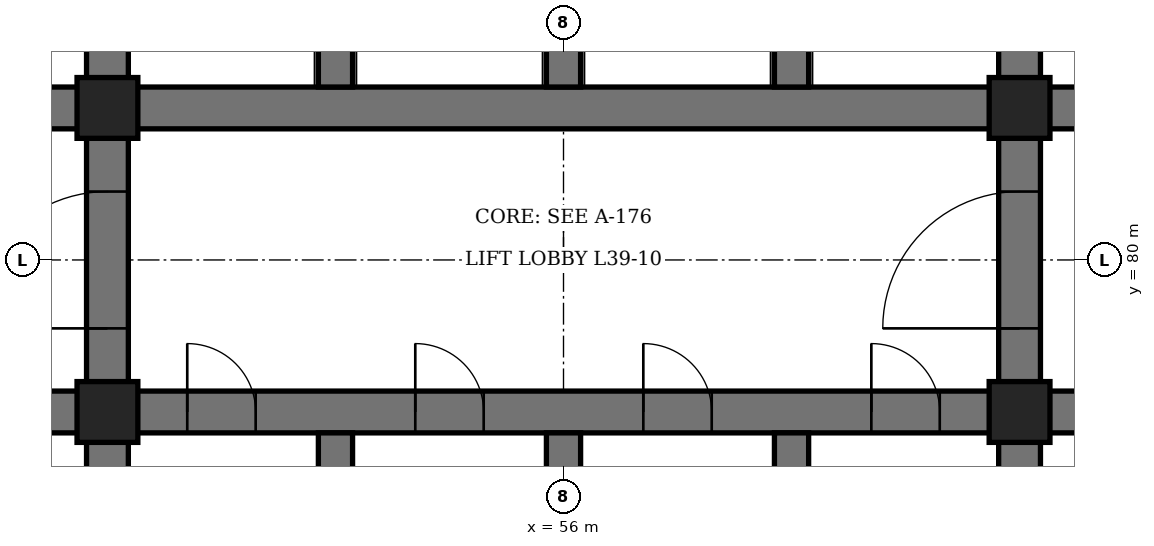
"""IFC4 building model, lengths in metres.
Left out: names, types, materials, properties, quantities, classifications, styles, units other than length and angle.
Written with IfcOpenShell. Run it as: python <this file> out.ifc"""

import sys

from ifc_helpers import new_model, si_unit, direction, frame, frame_2d, origin, origin_2d, place, context, subcontext, project, spatial, rectangle, hollow_rectangle, extrude, element, fill, save


model = new_model("IFC4")
c1 = context("Model", 3, precision=1e-05, world=origin(), true_north=direction((0.0, 1.0)))
c2 = subcontext(c1, "Body", "Model", "MODEL_VIEW")
j1 = project(units=[si_unit("LENGTHUNIT", "METRE"), si_unit("PLANEANGLEUNIT", "RADIAN")], contexts=[c1])
p1 = place(None, origin())
s1 = spatial("IfcSite", under=j1, at=p1, CompositionType="ELEMENT")
p2 = place(p1, origin())
s2 = spatial("IfcBuilding", under=s1, at=p2, CompositionType="ELEMENT")
p3 = place(p2, frame((0.0, 0.0, 175.3)))
s3 = spatial("IfcBuildingStorey", under=s2, at=p3, CompositionType="ELEMENT", Elevation=175.3)
p4 = place(p3, frame((50.0, 71.6, 0.0), z_axis=(0.0, 0.0, 1.0), x_axis=(0.0, 1.0, 0.0)))
e1 = element("IfcWall", 1, at=p4, inside=s3, PredefinedType="SHEAR", context=c2, shape_type="SweptSolid", body=[
    extrude(rectangle(XDim=16.8, YDim=0.55, at=frame_2d((8.4, 0.0))), origin(), (0.0, 0.0, 1.0), 6.0),
])
p5 = place(p4, frame((7.5, 0.0, 0.0)))
e2 = element("IfcOpeningElement", 2, at=p5, cuts=e1, PredefinedType="OPENING", context=c2, shape_type="SweptSolid", body=[
    extrude(rectangle(XDim=1.8, YDim=2.4, at=frame_2d((0.9, 1.2))), frame((0.0, 0.285, 0.0), z_axis=(0.0, -1.0, 0.0), x_axis=(1.0, 0.0, 0.0)), (0.0, 0.0, 1.0), 0.57),
])
p6 = place(p3, frame((62.0, 71.6, 0.0), z_axis=(0.0, 0.0, 1.0), x_axis=(0.0, 1.0, 0.0)))
e3 = element("IfcWall", 3, at=p6, inside=s3, PredefinedType="SHEAR", context=c2, shape_type="SweptSolid", body=[
    extrude(rectangle(XDim=16.8, YDim=0.55, at=frame_2d((8.4, 0.0))), origin(), (0.0, 0.0, 1.0), 6.0),
])
p7 = place(p6, frame((7.5, 0.0, 0.0)))
e4 = element("IfcOpeningElement", 4, at=p7, cuts=e3, PredefinedType="OPENING", context=c2, shape_type="SweptSolid", body=[
    extrude(rectangle(XDim=1.8, YDim=2.4, at=frame_2d((0.9, 1.2))), frame((0.0, 0.285, 0.0), z_axis=(0.0, -1.0, 0.0), x_axis=(1.0, 0.0, 0.0)), (0.0, 0.0, 1.0), 0.57),
])
p8 = place(p3, frame((44.6, 78.0, 0.0), z_axis=(0.0, 0.0, 1.0), x_axis=(1.0, 0.0, 0.0)))
e5 = element("IfcWall", 5, at=p8, inside=s3, PredefinedType="SHEAR", context=c2, shape_type="SweptSolid", body=[
    extrude(rectangle(XDim=5.125, YDim=0.55, at=frame_2d((2.562, 0.0))), origin(), (0.0, 0.0, 1.0), 6.0),
])
p9 = place(p8, frame((1.8, 0.0, 0.0)))
e6 = element("IfcOpeningElement", 6, at=p9, cuts=e5, PredefinedType="OPENING", context=c2, shape_type="SweptSolid", body=[
    extrude(rectangle(XDim=1.2, YDim=2.1, at=frame_2d((0.6, 1.05))), frame((0.0, 0.285, 0.0), z_axis=(0.0, -1.0, 0.0), x_axis=(1.0, 0.0, 0.0)), (0.0, 0.0, 1.0), 0.57),
])
p10 = place(p3, frame((44.6, 82.0, 0.0), z_axis=(0.0, 0.0, 1.0), x_axis=(1.0, 0.0, 0.0)))
e7 = element("IfcWall", 7, at=p10, inside=s3, PredefinedType="SHEAR", context=c2, shape_type="SweptSolid", body=[
    extrude(rectangle(XDim=5.125, YDim=0.55, at=frame_2d((2.562, 0.0))), origin(), (0.0, 0.0, 1.0), 6.0),
])
p11 = place(p10, frame((0.7, 0.0, 0.0)))
e8 = element("IfcOpeningElement", 8, at=p11, cuts=e7, PredefinedType="OPENING", context=c2, shape_type="SweptSolid", body=[
    extrude(rectangle(XDim=0.9, YDim=2.1, at=frame_2d((0.45, 1.05))), frame((0.0, 0.285, 0.0), z_axis=(0.0, -1.0, 0.0), x_axis=(1.0, 0.0, 0.0)), (0.0, 0.0, 1.0), 0.57),
])
p12 = place(p3, frame((62.275, 78.0, 0.0), z_axis=(0.0, 0.0, 1.0), x_axis=(1.0, 0.0, 0.0)))
e9 = element("IfcWall", 9, at=p12, inside=s3, PredefinedType="SHEAR", context=c2, shape_type="SweptSolid", body=[
    extrude(rectangle(XDim=5.125, YDim=0.55, at=frame_2d((2.562, 0.0))), origin(), (0.0, 0.0, 1.0), 6.0),
])
p13 = place(p12, frame((2.125, 0.0, 0.0)))
e10 = element("IfcOpeningElement", 10, at=p13, cuts=e9, PredefinedType="OPENING", context=c2, shape_type="SweptSolid", body=[
    extrude(rectangle(XDim=1.2, YDim=2.1, at=frame_2d((0.6, 1.05))), frame((0.0, 0.285, 0.0), z_axis=(0.0, -1.0, 0.0), x_axis=(1.0, 0.0, 0.0)), (0.0, 0.0, 1.0), 0.57),
])
p14 = place(p3, frame((62.275, 82.0, 0.0), z_axis=(0.0, 0.0, 1.0), x_axis=(1.0, 0.0, 0.0)))
e11 = element("IfcWall", 11, at=p14, inside=s3, PredefinedType="SHEAR", context=c2, shape_type="SweptSolid", body=[
    extrude(rectangle(XDim=5.125, YDim=0.55, at=frame_2d((2.562, 0.0))), origin(), (0.0, 0.0, 1.0), 6.0),
])
p15 = place(p14, frame((2.125, 0.0, 0.0)))
e12 = element("IfcOpeningElement", 12, at=p15, cuts=e11, PredefinedType="OPENING", context=c2, shape_type="SweptSolid", body=[
    extrude(rectangle(XDim=1.2, YDim=2.1, at=frame_2d((0.6, 1.05))), frame((0.0, 0.285, 0.0), z_axis=(0.0, -1.0, 0.0), x_axis=(1.0, 0.0, 0.0)), (0.0, 0.0, 1.0), 0.57),
])
p16 = place(p3, frame((50.275, 78.0, 0.0), z_axis=(0.0, 0.0, 1.0), x_axis=(1.0, 0.0, 0.0)))
e13 = element("IfcWall", 13, at=p16, inside=s3, PredefinedType="SHEAR", context=c2, shape_type="SweptSolid", body=[
    extrude(rectangle(XDim=11.45, YDim=0.55, at=frame_2d((5.725, 0.0))), origin(), (0.0, 0.0, 1.0), 6.0),
])
p17 = place(p16, frame((0.775, 0.0, 0.0)))
e14 = element("IfcOpeningElement", 14, at=p17, cuts=e13, PredefinedType="OPENING", context=c2, shape_type="SweptSolid", body=[
    extrude(rectangle(XDim=0.9, YDim=2.1, at=frame_2d((0.45, 1.05))), frame((0.0, 0.285, 0.0), z_axis=(0.0, -1.0, 0.0), x_axis=(1.0, 0.0, 0.0)), (0.0, 0.0, 1.0), 0.57),
])
p18 = place(p16, frame((3.775, 0.0, 0.0)))
e15 = element("IfcOpeningElement", 15, at=p18, cuts=e13, PredefinedType="OPENING", context=c2, shape_type="SweptSolid", body=[
    extrude(rectangle(XDim=0.9, YDim=2.1, at=frame_2d((0.45, 1.05))), frame((0.0, 0.285, 0.0), z_axis=(0.0, -1.0, 0.0), x_axis=(1.0, 0.0, 0.0)), (0.0, 0.0, 1.0), 0.57),
])
p19 = place(p16, frame((6.775, 0.0, 0.0)))
e16 = element("IfcOpeningElement", 16, at=p19, cuts=e13, PredefinedType="OPENING", context=c2, shape_type="SweptSolid", body=[
    extrude(rectangle(XDim=0.9, YDim=2.1, at=frame_2d((0.45, 1.05))), frame((0.0, 0.285, 0.0), z_axis=(0.0, -1.0, 0.0), x_axis=(1.0, 0.0, 0.0)), (0.0, 0.0, 1.0), 0.57),
])
p20 = place(p16, frame((9.775, 0.0, 0.0)))
e17 = element("IfcOpeningElement", 17, at=p20, cuts=e13, PredefinedType="OPENING", context=c2, shape_type="SweptSolid", body=[
    extrude(rectangle(XDim=0.9, YDim=2.1, at=frame_2d((0.45, 1.05))), frame((0.0, 0.285, 0.0), z_axis=(0.0, -1.0, 0.0), x_axis=(1.0, 0.0, 0.0)), (0.0, 0.0, 1.0), 0.57),
])
p21 = place(p3, frame((50.275, 82.0, 0.0), z_axis=(0.0, 0.0, 1.0), x_axis=(1.0, 0.0, 0.0)))
e18 = element("IfcWall", 18, at=p21, inside=s3, PredefinedType="SHEAR", context=c2, shape_type="SweptSolid", body=[
    extrude(rectangle(XDim=11.45, YDim=0.55, at=frame_2d((5.725, 0.0))), origin(), (0.0, 0.0, 1.0), 6.0),
])
p22 = place(p3, frame((53.0, 74.225, 0.0), z_axis=(0.0, 0.0, 1.0), x_axis=(0.0, 1.0, 0.0)))
e19 = element("IfcWall", 19, at=p22, inside=s3, PredefinedType="SHEAR", context=c2, shape_type="SweptSolid", body=[
    extrude(rectangle(XDim=3.5, YDim=0.45, at=frame_2d((1.75, 0.0))), origin(), (0.0, 0.0, 1.0), 6.0),
])
p23 = place(p3, frame((53.0, 82.275, 0.0), z_axis=(0.0, 0.0, 1.0), x_axis=(0.0, 1.0, 0.0)))
e20 = element("IfcWall", 20, at=p23, inside=s3, PredefinedType="SHEAR", context=c2, shape_type="SweptSolid", body=[
    extrude(rectangle(XDim=3.45, YDim=0.45, at=frame_2d((1.725, 0.0))), origin(), (0.0, 0.0, 1.0), 6.0),
])
p24 = place(p3, frame((56.0, 74.225, 0.0), z_axis=(0.0, 0.0, 1.0), x_axis=(0.0, 1.0, 0.0)))
e21 = element("IfcWall", 21, at=p24, inside=s3, PredefinedType="SHEAR", context=c2, shape_type="SweptSolid", body=[
    extrude(rectangle(XDim=3.5, YDim=0.45, at=frame_2d((1.75, 0.0))), origin(), (0.0, 0.0, 1.0), 6.0),
])
p25 = place(p3, frame((56.0, 82.275, 0.0), z_axis=(0.0, 0.0, 1.0), x_axis=(0.0, 1.0, 0.0)))
e22 = element("IfcWall", 22, at=p25, inside=s3, PredefinedType="SHEAR", context=c2, shape_type="SweptSolid", body=[
    extrude(rectangle(XDim=3.45, YDim=0.45, at=frame_2d((1.725, 0.0))), origin(), (0.0, 0.0, 1.0), 6.0),
])
p26 = place(p3, frame((59.0, 74.225, 0.0), z_axis=(0.0, 0.0, 1.0), x_axis=(0.0, 1.0, 0.0)))
e23 = element("IfcWall", 23, at=p26, inside=s3, PredefinedType="SHEAR", context=c2, shape_type="SweptSolid", body=[
    extrude(rectangle(XDim=3.5, YDim=0.45, at=frame_2d((1.75, 0.0))), origin(), (0.0, 0.0, 1.0), 6.0),
])
p27 = place(p3, frame((59.0, 82.275, 0.0), z_axis=(0.0, 0.0, 1.0), x_axis=(0.0, 1.0, 0.0)))
e24 = element("IfcWall", 24, at=p27, inside=s3, PredefinedType="SHEAR", context=c2, shape_type="SweptSolid", body=[
    extrude(rectangle(XDim=3.45, YDim=0.45, at=frame_2d((1.725, 0.0))), origin(), (0.0, 0.0, 1.0), 6.0),
])
for number, where, z_axis, x_axis in (
    (25, (50.0, 78.0, 0.0), (0.0, 0.0, 1.0), (1.0, 0.0, 0.0)),
    (26, (50.0, 82.0, 0.0), (0.0, 0.0, 1.0), (1.0, 0.0, 0.0)),
    (27, (62.0, 78.0, 0.0), (0.0, 0.0, 1.0), (1.0, 0.0, 0.0)),
    (28, (62.0, 82.0, 0.0), (0.0, 0.0, 1.0), (1.0, 0.0, 0.0)),
):
    element("IfcColumn", number, at=place(p3, frame(where, z_axis=z_axis, x_axis=x_axis)), inside=s3, PredefinedType="COLUMN", context=c2, shape_type="SweptSolid", body=[
        extrude(hollow_rectangle(XDim=0.8, YDim=0.8, WallThickness=0.1, at=origin_2d()), origin(), (0.0, 0.0, 1.0), 6.0),
    ])
p28 = place(p17, origin())
e29 = element("IfcDoor", 29, at=p28, inside=s3, OperationType="SINGLE_SWING_LEFT", PredefinedType="DOOR", context=c2, shape_type="SweptSolid", body=[
    extrude(rectangle(XDim=0.9, YDim=2.1, at=frame_2d((0.45, 1.05))), frame((0.0, 0.275, 0.0), z_axis=(0.0, -1.0, 0.0), x_axis=(1.0, 0.0, 0.0)), (0.0, 0.0, 1.0), 0.55),
])
fill(e14, e29)
p29 = place(p18, origin())
e30 = element("IfcDoor", 30, at=p29, inside=s3, OperationType="SINGLE_SWING_LEFT", PredefinedType="DOOR", context=c2, shape_type="SweptSolid", body=[
    extrude(rectangle(XDim=0.9, YDim=2.1, at=frame_2d((0.45, 1.05))), frame((0.0, 0.275, 0.0), z_axis=(0.0, -1.0, 0.0), x_axis=(1.0, 0.0, 0.0)), (0.0, 0.0, 1.0), 0.55),
])
fill(e15, e30)
p30 = place(p19, origin())
e31 = element("IfcDoor", 31, at=p30, inside=s3, OperationType="SINGLE_SWING_LEFT", PredefinedType="DOOR", context=c2, shape_type="SweptSolid", body=[
    extrude(rectangle(XDim=0.9, YDim=2.1, at=frame_2d((0.45, 1.05))), frame((0.0, 0.275, 0.0), z_axis=(0.0, -1.0, 0.0), x_axis=(1.0, 0.0, 0.0)), (0.0, 0.0, 1.0), 0.55),
])
fill(e16, e31)
p31 = place(p20, origin())
e32 = element("IfcDoor", 32, at=p31, inside=s3, OperationType="SINGLE_SWING_LEFT", PredefinedType="DOOR", context=c2, shape_type="SweptSolid", body=[
    extrude(rectangle(XDim=0.9, YDim=2.1, at=frame_2d((0.45, 1.05))), frame((0.0, 0.275, 0.0), z_axis=(0.0, -1.0, 0.0), x_axis=(1.0, 0.0, 0.0)), (0.0, 0.0, 1.0), 0.55),
])
fill(e17, e32)
p32 = place(p5, origin())
e33 = element("IfcDoor", 33, at=p32, inside=s3, OperationType="DOUBLE_DOOR_SINGLE_SWING", PredefinedType="DOOR", context=c2, shape_type="SweptSolid", body=[
    extrude(rectangle(XDim=1.8, YDim=2.4, at=frame_2d((0.9, 1.2))), frame((0.0, 0.275, 0.0), z_axis=(0.0, -1.0, 0.0), x_axis=(1.0, 0.0, 0.0)), (0.0, 0.0, 1.0), 0.55),
])
fill(e2, e33)
p33 = place(p7, origin())
e34 = element("IfcDoor", 34, at=p33, inside=s3, OperationType="DOUBLE_DOOR_SINGLE_SWING", PredefinedType="DOOR", context=c2, shape_type="SweptSolid", body=[
    extrude(rectangle(XDim=1.8, YDim=2.4, at=frame_2d((0.9, 1.2))), frame((0.0, 0.275, 0.0), z_axis=(0.0, -1.0, 0.0), x_axis=(1.0, 0.0, 0.0)), (0.0, 0.0, 1.0), 0.55),
])
fill(e4, e34)
save(model, sys.argv[1])
